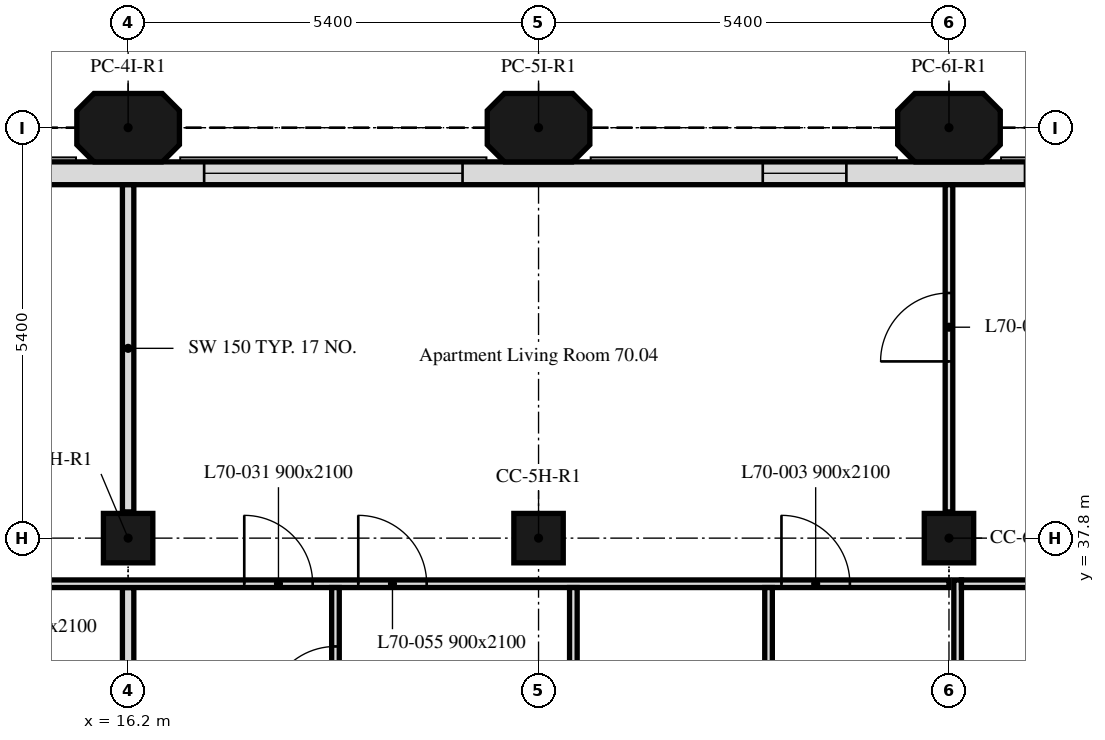
"""IFC4 building model, lengths in metres.
Left out: names, types, materials, properties, quantities, classifications, styles, units other than length and angle.
Written with IfcOpenShell. Run it as: python <this file> out.ifc"""

import sys

from ifc_helpers import new_model, si_unit, direction, frame, frame_2d, origin, origin_2d, place, context, subcontext, project, spatial, polyline, rectangle, outline, extrude, element, fill, save


model = new_model("IFC4")
c1 = context("Model", 3, precision=1e-05, world=origin(), true_north=direction((0.0, 1.0)))
c2 = subcontext(c1, "Body", "Model", "MODEL_VIEW")
j1 = project(units=[si_unit("LENGTHUNIT", "METRE"), si_unit("PLANEANGLEUNIT", "RADIAN")], contexts=[c1])
p1 = place(None, origin())
s1 = spatial("IfcSite", under=j1, at=p1, CompositionType="ELEMENT")
p2 = place(p1, origin())
s2 = spatial("IfcBuilding", under=s1, at=p2, CompositionType="ELEMENT")
p3 = place(p2, frame((0.0, 0.0, 285.1)))
s3 = spatial("IfcBuildingStorey", under=s2, at=p3, CompositionType="ELEMENT", Elevation=285.1)
for number, where, z_axis, x_axis in (
    (1, (16.2, 37.8, 0.0), (0.0, 0.0, 1.0), (1.0, 0.0, 0.0)),
    (2, (21.6, 37.8, 0.0), (0.0, 0.0, 1.0), (1.0, 0.0, 0.0)),
    (3, (27.0, 37.8, 0.0), (0.0, 0.0, 1.0), (1.0, 0.0, 0.0)),
):
    element("IfcColumn", number, at=place(p3, frame(where, z_axis=z_axis, x_axis=x_axis)), inside=s3, PredefinedType="COLUMN", context=c2, shape_type="SweptSolid", body=[
        extrude(rectangle(XDim=0.65, YDim=0.65, at=origin_2d()), origin(), (0.0, 0.0, 1.0), 3.0),
    ])
for number, where, z_axis, x_axis in (
    (4, (16.2, 43.2, 0.0), (0.0, 0.0, 1.0), (1.0, 0.0, 0.0)),
    (5, (21.6, 43.2, 0.0), (0.0, 0.0, 1.0), (1.0, 0.0, 0.0)),
    (6, (27.0, 43.2, 0.0), (0.0, 0.0, 1.0), (1.0, 0.0, 0.0)),
):
    element("IfcColumn", number, at=place(p3, frame(where, z_axis=z_axis, x_axis=x_axis)), inside=s3, PredefinedType="COLUMN", context=c2, shape_type="SweptSolid", body=[
        extrude(outline(polyline([(-0.45, -0.45), (0.45, -0.45), (0.675, -0.225), (0.675, 0.225), (0.45, 0.45), (-0.45, 0.45), (-0.675, 0.225), (-0.675, -0.225), (-0.45, -0.45)])), origin(), (0.0, 0.0, 1.0), 3.0),
    ])
p4 = place(p3, frame((43.014, 42.6, 0.0), z_axis=(0.0, 0.0, 1.0), x_axis=(-1.0, 0.0, 0.0)))
e7 = element("IfcWall", 7, at=p4, inside=s3, PredefinedType="SOLIDWALL", context=c2, shape_type="SweptSolid", body=[
    extrude(rectangle(XDim=32.027, YDim=0.3, at=frame_2d((16.014, 0.0))), origin(), (0.0, 0.0, 1.0), 3.0),
])
p5 = place(p4, frame((0.814, 0.0, 0.9)))
e8 = element("IfcOpeningElement", 8, at=p5, cuts=e7, PredefinedType="OPENING", context=c2, shape_type="SweptSolid", body=[
    extrude(rectangle(XDim=3.4, YDim=1.7, at=frame_2d((1.7, 0.85))), frame((0.0, 0.16, 0.0), z_axis=(0.0, -1.0, 0.0), x_axis=(1.0, 0.0, 0.0)), (0.0, 0.0, 1.0), 0.32),
])
p6 = place(p4, frame((6.564, 0.0, 0.9)))
e9 = element("IfcOpeningElement", 9, at=p6, cuts=e7, PredefinedType="OPENING", context=c2, shape_type="SweptSolid", body=[
    extrude(rectangle(XDim=1.1, YDim=1.7, at=frame_2d((0.55, 0.85))), frame((0.0, 0.16, 0.0), z_axis=(0.0, -1.0, 0.0), x_axis=(1.0, 0.0, 0.0)), (0.0, 0.0, 1.0), 0.32),
])
p7 = place(p4, frame((11.614, 0.0, 0.9)))
e10 = element("IfcOpeningElement", 10, at=p7, cuts=e7, PredefinedType="OPENING", context=c2, shape_type="SweptSolid", body=[
    extrude(rectangle(XDim=3.4, YDim=1.7, at=frame_2d((1.7, 0.85))), frame((0.0, 0.16, 0.0), z_axis=(0.0, -1.0, 0.0), x_axis=(1.0, 0.0, 0.0)), (0.0, 0.0, 1.0), 0.32),
])
p8 = place(p4, frame((17.364, 0.0, 0.9)))
e11 = element("IfcOpeningElement", 11, at=p8, cuts=e7, PredefinedType="OPENING", context=c2, shape_type="SweptSolid", body=[
    extrude(rectangle(XDim=1.1, YDim=1.7, at=frame_2d((0.55, 0.85))), frame((0.0, 0.16, 0.0), z_axis=(0.0, -1.0, 0.0), x_axis=(1.0, 0.0, 0.0)), (0.0, 0.0, 1.0), 0.32),
])
p9 = place(p4, frame((22.414, 0.0, 0.9)))
e12 = element("IfcOpeningElement", 12, at=p9, cuts=e7, PredefinedType="OPENING", context=c2, shape_type="SweptSolid", body=[
    extrude(rectangle(XDim=3.4, YDim=1.7, at=frame_2d((1.7, 0.85))), frame((0.0, 0.16, 0.0), z_axis=(0.0, -1.0, 0.0), x_axis=(1.0, 0.0, 0.0)), (0.0, 0.0, 1.0), 0.32),
])
p10 = place(p4, frame((28.164, 0.0, 0.9)))
e13 = element("IfcOpeningElement", 13, at=p10, cuts=e7, PredefinedType="OPENING", context=c2, shape_type="SweptSolid", body=[
    extrude(rectangle(XDim=1.1, YDim=1.7, at=frame_2d((0.55, 0.85))), frame((0.0, 0.16, 0.0), z_axis=(0.0, -1.0, 0.0), x_axis=(1.0, 0.0, 0.0)), (0.0, 0.0, 1.0), 0.32),
])
p11 = place(p3, frame((16.2, 38.145, 0.0), z_axis=(0.0, 0.0, 1.0), x_axis=(0.0, 1.0, 0.0)))
e14 = element("IfcWall", 14, at=p11, inside=s3, PredefinedType="PARTITIONING", context=c2, shape_type="SweptSolid", body=[
    extrude(rectangle(XDim=4.304, YDim=0.15, at=frame_2d((2.152, 0.0))), origin(), (0.0, 0.0, 1.0), 2.4),
])
p12 = place(p3, frame((16.2, 34.725, 0.0), z_axis=(0.0, 0.0, 1.0), x_axis=(0.0, 1.0, 0.0)))
e15 = element("IfcWall", 15, at=p12, inside=s3, PredefinedType="PARTITIONING", context=c2, shape_type="SweptSolid", body=[
    extrude(rectangle(XDim=2.425, YDim=0.15, at=frame_2d((1.212, 0.0))), origin(), (0.0, 0.0, 1.0), 2.4),
])
p13 = place(p3, frame((10.8, 37.2, 0.0), z_axis=(0.0, 0.0, 1.0), x_axis=(1.0, 0.0, 0.0)))
e16 = element("IfcWall", 16, at=p13, inside=s3, PredefinedType="PARTITIONING", context=c2, shape_type="SweptSolid", body=[
    extrude(rectangle(XDim=16.2, YDim=0.1, at=frame_2d((8.1, 0.0))), origin(), (0.0, 0.0, 1.0), 2.4),
])
p14 = place(p13, frame((2.995, 0.0, 0.0)))
e17 = element("IfcOpeningElement", 17, at=p14, cuts=e16, PredefinedType="OPENING", context=c2, shape_type="SweptSolid", body=[
    extrude(rectangle(XDim=0.9, YDim=2.1, at=frame_2d((0.45, 1.05))), frame((0.0, 0.05, 0.0), z_axis=(0.0, -1.0, 0.0), x_axis=(1.0, 0.0, 0.0)), (0.0, 0.0, 1.0), 0.1),
])
p15 = place(p13, frame((13.996, 0.0, 0.0)))
e18 = element("IfcOpeningElement", 18, at=p15, cuts=e16, PredefinedType="OPENING", context=c2, shape_type="SweptSolid", body=[
    extrude(rectangle(XDim=0.9, YDim=2.1, at=frame_2d((0.45, 1.05))), frame((0.0, 0.05, 0.0), z_axis=(0.0, -1.0, 0.0), x_axis=(1.0, 0.0, 0.0)), (0.0, 0.0, 1.0), 0.1),
])
p16 = place(p13, frame((6.928, 0.0, 0.0)))
e19 = element("IfcOpeningElement", 19, at=p16, cuts=e16, PredefinedType="OPENING", context=c2, shape_type="SweptSolid", body=[
    extrude(rectangle(XDim=0.9, YDim=2.1, at=frame_2d((0.45, 1.05))), frame((0.0, 0.05, 0.0), z_axis=(0.0, -1.0, 0.0), x_axis=(1.0, 0.0, 0.0)), (0.0, 0.0, 1.0), 0.1),
])
p17 = place(p13, frame((8.428, 0.0, 0.0)))
e20 = element("IfcOpeningElement", 20, at=p17, cuts=e16, PredefinedType="OPENING", context=c2, shape_type="SweptSolid", body=[
    extrude(rectangle(XDim=0.9, YDim=2.1, at=frame_2d((0.45, 1.05))), frame((0.0, 0.05, 0.0), z_axis=(0.0, -1.0, 0.0), x_axis=(1.0, 0.0, 0.0)), (0.0, 0.0, 1.0), 0.1),
])
p18 = place(p3, frame((27.0, 38.145, 0.0), z_axis=(0.0, 0.0, 1.0), x_axis=(0.0, 1.0, 0.0)))
e21 = element("IfcWall", 21, at=p18, inside=s3, PredefinedType="PARTITIONING", context=c2, shape_type="SweptSolid", body=[
    extrude(rectangle(XDim=4.304, YDim=0.1, at=frame_2d((2.152, 0.0))), origin(), (0.0, 0.0, 1.0), 2.4),
])
p19 = place(p18, frame((1.98, 0.0, 0.0)))
e22 = element("IfcOpeningElement", 22, at=p19, cuts=e21, PredefinedType="OPENING", context=c2, shape_type="SweptSolid", body=[
    extrude(rectangle(XDim=0.9, YDim=2.1, at=frame_2d((0.45, 1.05))), frame((0.0, 0.05, 0.0), z_axis=(0.0, -1.0, 0.0), x_axis=(1.0, 0.0, 0.0)), (0.0, 0.0, 1.0), 0.1),
])
p20 = place(p3, frame((18.928, 34.725, 0.0), z_axis=(0.0, 0.0, 1.0), x_axis=(0.0, 1.0, 0.0)))
e23 = element("IfcWall", 23, at=p20, inside=s3, PredefinedType="PARTITIONING", context=c2, shape_type="SweptSolid", body=[
    extrude(rectangle(XDim=2.425, YDim=0.1, at=frame_2d((1.212, 0.0))), origin(), (0.0, 0.0, 1.0), 3.0),
])
p21 = place(p20, frame((0.75, 0.0, 0.0)))
e24 = element("IfcOpeningElement", 24, at=p21, cuts=e23, PredefinedType="OPENING", context=c2, shape_type="SweptSolid", body=[
    extrude(rectangle(XDim=0.9, YDim=2.1, at=frame_2d((0.45, 1.05))), frame((0.0, 0.05, 0.0), z_axis=(0.0, -1.0, 0.0), x_axis=(1.0, 0.0, 0.0)), (0.0, 0.0, 1.0), 0.1),
])
p22 = place(p3, frame((22.058, 34.725, 0.0), z_axis=(0.0, 0.0, 1.0), x_axis=(0.0, 1.0, 0.0)))
e25 = element("IfcWall", 25, at=p22, inside=s3, PredefinedType="PARTITIONING", context=c2, shape_type="SweptSolid", body=[
    extrude(rectangle(XDim=2.425, YDim=0.1, at=frame_2d((1.212, 0.0))), origin(), (0.0, 0.0, 1.0), 3.0),
])
p23 = place(p22, frame((0.25, 0.0, 0.0)))
e26 = element("IfcOpeningElement", 26, at=p23, cuts=e25, PredefinedType="OPENING", context=c2, shape_type="SweptSolid", body=[
    extrude(rectangle(XDim=0.9, YDim=2.1, at=frame_2d((0.45, 1.05))), frame((0.0, 0.05, 0.0), z_axis=(0.0, -1.0, 0.0), x_axis=(1.0, 0.0, 0.0)), (0.0, 0.0, 1.0), 0.1),
])
p24 = place(p3, frame((24.626, 34.725, 0.0), z_axis=(0.0, 0.0, 1.0), x_axis=(0.0, 1.0, 0.0)))
e27 = element("IfcWall", 27, at=p24, inside=s3, PredefinedType="PARTITIONING", context=c2, shape_type="SweptSolid", body=[
    extrude(rectangle(XDim=2.425, YDim=0.1, at=frame_2d((1.212, 0.0))), origin(), (0.0, 0.0, 1.0), 3.0),
])
p25 = place(p3, frame((27.114, 34.725, 0.0), z_axis=(0.0, 0.0, 1.0), x_axis=(0.0, 1.0, 0.0)))
e28 = element("IfcWall", 28, at=p25, inside=s3, PredefinedType="PARTITIONING", context=c2, shape_type="SweptSolid", body=[
    extrude(rectangle(XDim=2.525, YDim=0.1, at=frame_2d((1.262, 0.0))), origin(), (0.0, 0.0, 1.0), 2.4),
])
p26 = place(p3, frame((27.164, 37.2, 0.0), z_axis=(0.0, 0.0, 1.0), x_axis=(1.0, 0.0, 0.0)))
e29 = element("IfcWall", 29, at=p26, inside=s3, PredefinedType="PARTITIONING", context=c2, shape_type="SweptSolid", body=[
    extrude(rectangle(XDim=10.636, YDim=0.1, at=frame_2d((5.318, 0.0))), origin(), (0.0, 0.0, 1.0), 2.4),
])
p27 = place(p26, frame((1.807, 0.0, 0.0)))
e30 = element("IfcOpeningElement", 30, at=p27, cuts=e29, PredefinedType="OPENING", context=c2, shape_type="SweptSolid", body=[
    extrude(rectangle(XDim=0.9, YDim=2.1, at=frame_2d((0.45, 1.05))), frame((0.0, 0.05, 0.0), z_axis=(0.0, -1.0, 0.0), x_axis=(1.0, 0.0, 0.0)), (0.0, 0.0, 1.0), 0.1),
])
p28 = place(p26, frame((3.941, 0.0, 0.0)))
e31 = element("IfcOpeningElement", 31, at=p28, cuts=e29, PredefinedType="OPENING", context=c2, shape_type="SweptSolid", body=[
    extrude(rectangle(XDim=0.9, YDim=2.1, at=frame_2d((0.45, 1.05))), frame((0.0, 0.05, 0.0), z_axis=(0.0, -1.0, 0.0), x_axis=(1.0, 0.0, 0.0)), (0.0, 0.0, 1.0), 0.1),
])
p29 = place(p26, frame((6.586, 0.0, 0.0)))
e32 = element("IfcOpeningElement", 32, at=p29, cuts=e29, PredefinedType="OPENING", context=c2, shape_type="SweptSolid", body=[
    extrude(rectangle(XDim=0.9, YDim=2.1, at=frame_2d((0.45, 1.05))), frame((0.0, 0.05, 0.0), z_axis=(0.0, -1.0, 0.0), x_axis=(1.0, 0.0, 0.0)), (0.0, 0.0, 1.0), 0.1),
])
p30 = place(p8, origin())
e33 = element("IfcWindow", 33, at=p30, inside=s3, PartitioningType="SINGLE_PANEL", PredefinedType="WINDOW", context=c2, shape_type="SweptSolid", body=[
    extrude(rectangle(XDim=1.1, YDim=1.7, at=frame_2d((0.55, 0.85))), frame((0.0, 0.03, 0.0), z_axis=(0.0, -1.0, 0.0), x_axis=(1.0, 0.0, 0.0)), (0.0, 0.0, 1.0), 0.06),
])
fill(e11, e33)
p31 = place(p9, origin())
e34 = element("IfcWindow", 34, at=p31, inside=s3, PartitioningType="SINGLE_PANEL", PredefinedType="WINDOW", context=c2, shape_type="SweptSolid", body=[
    extrude(rectangle(XDim=3.4, YDim=1.7, at=frame_2d((1.7, 0.85))), frame((0.0, 0.03, 0.0), z_axis=(0.0, -1.0, 0.0), x_axis=(1.0, 0.0, 0.0)), (0.0, 0.0, 1.0), 0.06),
])
fill(e12, e34)
p32 = place(p15, origin())
e35 = element("IfcDoor", 35, at=p32, inside=s3, OperationType="SINGLE_SWING_RIGHT", PredefinedType="DOOR", context=c2, shape_type="SweptSolid", body=[
    extrude(rectangle(XDim=0.9, YDim=2.1, at=frame_2d((0.45, 1.05))), frame((0.0, 0.025, 0.0), z_axis=(0.0, -1.0, 0.0), x_axis=(1.0, 0.0, 0.0)), (0.0, 0.0, 1.0), 0.05),
])
fill(e18, e35)
p33 = place(p16, origin())
e36 = element("IfcDoor", 36, at=p33, inside=s3, OperationType="SINGLE_SWING_LEFT", PredefinedType="DOOR", context=c2, shape_type="SweptSolid", body=[
    extrude(rectangle(XDim=0.9, YDim=2.1, at=frame_2d((0.45, 1.05))), frame((0.0, 0.025, 0.0), z_axis=(0.0, -1.0, 0.0), x_axis=(1.0, 0.0, 0.0)), (0.0, 0.0, 1.0), 0.05),
])
fill(e19, e36)
p34 = place(p21, origin())
e37 = element("IfcDoor", 37, at=p34, inside=s3, OperationType="SINGLE_SWING_LEFT", PredefinedType="DOOR", context=c2, shape_type="SweptSolid", body=[
    extrude(rectangle(XDim=0.9, YDim=2.1, at=frame_2d((0.45, 1.05))), frame((0.0, 0.025, 0.0), z_axis=(0.0, -1.0, 0.0), x_axis=(1.0, 0.0, 0.0)), (0.0, 0.0, 1.0), 0.05),
])
fill(e24, e37)
p35 = place(p19, origin())
e38 = element("IfcDoor", 38, at=p35, inside=s3, OperationType="SINGLE_SWING_LEFT", PredefinedType="DOOR", context=c2, shape_type="SweptSolid", body=[
    extrude(rectangle(XDim=0.9, YDim=2.1, at=frame_2d((0.45, 1.05))), frame((0.0, 0.025, 0.0), z_axis=(0.0, -1.0, 0.0), x_axis=(1.0, 0.0, 0.0)), (0.0, 0.0, 1.0), 0.05),
])
fill(e22, e38)
p36 = place(p17, origin())
e39 = element("IfcDoor", 39, at=p36, inside=s3, OperationType="SINGLE_SWING_RIGHT", PredefinedType="DOOR", context=c2, shape_type="SweptSolid", body=[
    extrude(rectangle(XDim=0.9, YDim=2.1, at=frame_2d((0.45, 1.05))), frame((0.0, 0.025, 0.0), z_axis=(0.0, -1.0, 0.0), x_axis=(1.0, 0.0, 0.0)), (0.0, 0.0, 1.0), 0.05),
])
fill(e20, e39)
save(model, sys.argv[1])
